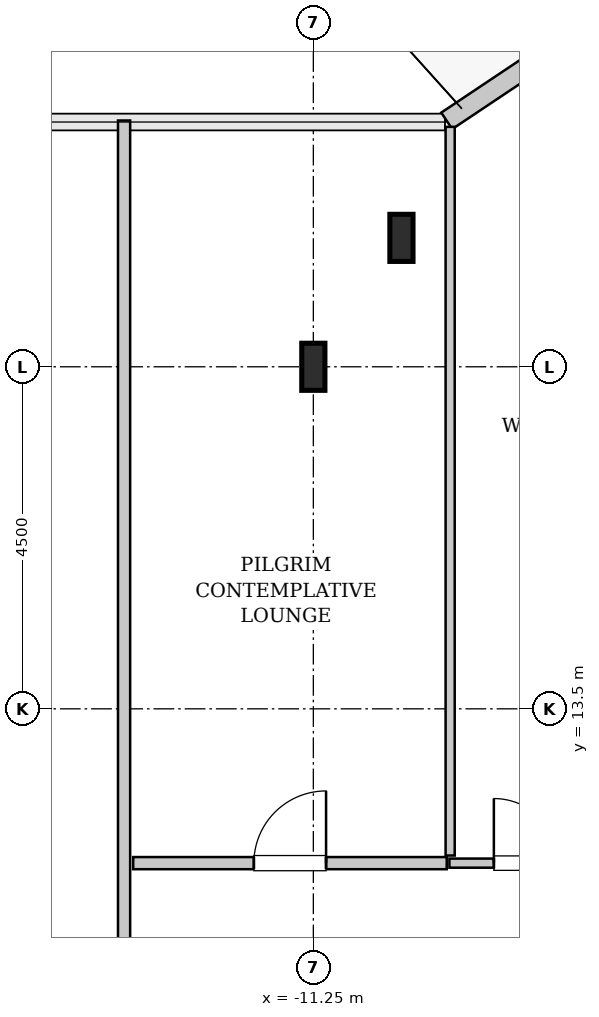
"""IFC4 building model, lengths in metres.
Left out: names, types, materials, properties, quantities, classifications, styles, units other than length and angle.
Written with IfcOpenShell. Run it as: python <this file> out.ifc"""

import sys

from ifc_helpers import new_model, si_unit, direction, frame, frame_2d, origin, origin_2d, place, context, subcontext, project, spatial, rectangle, i_section, extrude, source, transform, mapped, element, fill, save


model = new_model("IFC4")
c1 = context("Model", 3, precision=1e-05, world=origin(), true_north=direction((0.0, 1.0)))
c2 = subcontext(c1, "Body", "Model", "MODEL_VIEW")
j1 = project(units=[si_unit("LENGTHUNIT", "METRE"), si_unit("PLANEANGLEUNIT", "RADIAN")], contexts=[c1])
p1 = place(None, origin())
s1 = spatial("IfcSite", under=j1, at=p1, CompositionType="ELEMENT")
p2 = place(p1, origin())
s2 = spatial("IfcBuilding", under=s1, at=p2, CompositionType="ELEMENT")
p3 = place(p2, frame((0.0, 0.0, 287.4)))
s3 = spatial("IfcBuildingStorey", under=s2, at=p3, CompositionType="ELEMENT", Elevation=287.4)
m1 = source(origin(), c2, "Body", "SweptSolid", [
    extrude(i_section(OverallWidth=0.305, OverallDepth=0.62, WebThickness=0.021, FlangeThickness=0.04, FilletRadius=0.027, at=origin_2d()), origin(), (0.0, 0.0, 1.0), 3.8),
])
for number, where, z_axis, x_axis in (
    (1, (-11.25, 18.0, 0.0), (0.0, 0.0, 1.0), (1.0, 0.0, 0.0)),
    (2, (-10.091, 19.696, 0.0), (0.0, 0.0, 1.0), (1.0, 0.0, 0.0)),
):
    element("IfcColumn", number, at=place(p3, frame(where, z_axis=z_axis, x_axis=x_axis)), inside=s3, PredefinedType="COLUMN", context=c2, shape_type="MappedRepresentation", body=[
        mapped(m1, transform((0.0, 0.0, 0.0), x_axis=(1.0, 0.0, 0.0), y_axis=(0.0, 1.0, 0.0), z_axis=(0.0, 0.0, 1.0), scale=1.0)),
    ])
m2 = source(origin(), c2, "Body", "SweptSolid", [
    extrude(rectangle(XDim=1.469, YDim=0.26, at=frame_2d((0.734, 0.0))), origin(), (0.0, 0.0, 1.0), 3.55),
])
p4 = place(p3, frame((-8.273, 22.052, 0.0), z_axis=(0.0, 0.0, 1.0), x_axis=(-0.831461760506, -0.555581983884, 0.0)))
e3 = element("IfcWall", 3, at=p4, inside=s3, PredefinedType="SOLIDWALL", context=c2, shape_type="MappedRepresentation", body=[
    mapped(m2, transform((0.0, 0.0, 0.0), x_axis=(1.0, 0.0, 0.0), y_axis=(0.0, 1.0, 0.0), z_axis=(0.0, 0.0, 1.0), scale=1.0)),
])
m3 = source(origin(), c2, "Body", "SweptSolid", [
    extrude(rectangle(XDim=2.02, YDim=0.12, at=frame_2d((1.01, 0.0))), origin(), (0.0, 0.0, 1.0), 3.535),
])
p5 = place(p3, frame((-9.46, 11.47, 0.0), z_axis=(0.0, 0.0, 1.0), x_axis=(1.0, 0.0, 0.0)))
e4 = element("IfcWall", 4, at=p5, inside=s3, PredefinedType="PLUMBINGWALL", context=c2, shape_type="MappedRepresentation", body=[
    mapped(m3, transform((0.0, 0.0, 0.0), x_axis=(1.0, 0.0, 0.0), y_axis=(0.0, 1.0, 0.0), z_axis=(0.0, 0.0, 1.0), scale=1.0)),
])
p6 = place(p5, frame((0.585, 0.0, 0.0)))
e5 = element("IfcOpeningElement", 5, at=p6, cuts=e4, PredefinedType="OPENING", context=c2, shape_type="SweptSolid", body=[
    extrude(rectangle(XDim=0.85, YDim=2.1, at=frame_2d((0.425, 1.05))), frame((0.0, 0.07, 0.0), z_axis=(0.0, -1.0, 0.0), x_axis=(1.0, 0.0, 0.0)), (0.0, 0.0, 1.0), 0.14),
])
m4 = source(origin(), c2, "Body", "SweptSolid", [
    extrude(rectangle(XDim=9.587, YDim=0.12, at=frame_2d((4.793, 0.0))), origin(), (0.0, 0.0, 1.0), 3.535),
])
p7 = place(p3, frame((-9.45, 11.57, 0.0), z_axis=(0.0, 0.0, 1.0), x_axis=(0.0, 1.0, 0.0)))
e6 = element("IfcWall", 6, at=p7, inside=s3, PredefinedType="PLUMBINGWALL", context=c2, shape_type="MappedRepresentation", body=[
    mapped(m4, transform((0.0, 0.0, 0.0), x_axis=(1.0, 0.0, 0.0), y_axis=(0.0, 1.0, 0.0), z_axis=(0.0, 0.0, 1.0), scale=1.0)),
])
m5 = source(origin(), c2, "Body", "SweptSolid", [
    extrude(rectangle(XDim=12.752, YDim=0.16, at=frame_2d((6.376, 0.0))), origin(), (0.0, 0.0, 1.0), 3.535),
])
p8 = place(p3, frame((-13.74, 8.488, 0.0), z_axis=(0.0, 0.0, 1.0), x_axis=(0.0, 1.0, 0.0)))
e7 = element("IfcWall", 7, at=p8, inside=s3, PredefinedType="PARTITIONING", context=c2, shape_type="MappedRepresentation", body=[
    mapped(m5, transform((0.0, 0.0, 0.0), x_axis=(1.0, 0.0, 0.0), y_axis=(0.0, 1.0, 0.0), z_axis=(0.0, 0.0, 1.0), scale=1.0)),
])
p9 = place(p8, frame((1.036, 0.0, 0.0)))
e8 = element("IfcOpeningElement", 8, at=p9, cuts=e7, PredefinedType="OPENING", context=c2, shape_type="SweptSolid", body=[
    extrude(rectangle(XDim=0.95, YDim=2.1, at=frame_2d((0.475, 1.05))), frame((0.0, 0.09, 0.0), z_axis=(0.0, -1.0, 0.0), x_axis=(1.0, 0.0, 0.0)), (0.0, 0.0, 1.0), 0.18),
])
m6 = source(origin(), c2, "Body", "SweptSolid", [
    extrude(rectangle(XDim=4.125, YDim=0.16, at=frame_2d((2.062, 0.0))), origin(), (0.0, 0.0, 1.0), 3.535),
])
p10 = place(p3, frame((-13.62, 11.47, 0.0), z_axis=(0.0, 0.0, 1.0), x_axis=(1.0, 0.0, 0.0)))
e9 = element("IfcWall", 9, at=p10, inside=s3, PredefinedType="PARTITIONING", context=c2, shape_type="MappedRepresentation", body=[
    mapped(m6, transform((0.0, 0.0, 0.0), x_axis=(1.0, 0.0, 0.0), y_axis=(0.0, 1.0, 0.0), z_axis=(0.0, 0.0, 1.0), scale=1.0)),
])
p11 = place(p10, frame((1.587, 0.0, 0.0)))
e10 = element("IfcOpeningElement", 10, at=p11, cuts=e9, PredefinedType="OPENING", context=c2, shape_type="SweptSolid", body=[
    extrude(rectangle(XDim=0.95, YDim=2.1, at=frame_2d((0.475, 1.05))), frame((0.0, 0.09, 0.0), z_axis=(0.0, -1.0, 0.0), x_axis=(1.0, 0.0, 0.0)), (0.0, 0.0, 1.0), 0.18),
])
m7 = source(origin(), c2, "Body", "SweptSolid", [
    extrude(rectangle(XDim=0.85, YDim=2.1, at=frame_2d((0.425, 1.05))), frame((0.0, 0.025, 0.0), z_axis=(0.0, -1.0, 0.0), x_axis=(1.0, 0.0, 0.0)), (0.0, 0.0, 1.0), 0.05),
])
p12 = place(p6, origin())
e11 = element("IfcDoor", 11, at=p12, inside=s3, OperationType="SINGLE_SWING_LEFT", PredefinedType="DOOR", context=c2, shape_type="MappedRepresentation", body=[
    mapped(m7, transform((0.0, 0.0, 0.0), x_axis=(1.0, 0.0, 0.0), y_axis=(0.0, 1.0, 0.0), z_axis=(0.0, 0.0, 1.0), scale=1.0)),
])
fill(e5, e11)
m8 = source(origin(), c2, "Body", "SweptSolid", [
    extrude(rectangle(XDim=0.95, YDim=2.1, at=frame_2d((0.475, 1.05))), frame((0.0, 0.025, 0.0), z_axis=(0.0, -1.0, 0.0), x_axis=(1.0, 0.0, 0.0)), (0.0, 0.0, 1.0), 0.05),
])
p13 = place(p11, origin())
e12 = element("IfcDoor", 12, at=p13, inside=s3, OperationType="SINGLE_SWING_RIGHT", PredefinedType="DOOR", context=c2, shape_type="MappedRepresentation", body=[
    mapped(m8, transform((0.0, 0.0, 0.0), x_axis=(1.0, 0.0, 0.0), y_axis=(0.0, 1.0, 0.0), z_axis=(0.0, 0.0, 1.0), scale=1.0)),
])
fill(e10, e12)
save(model, sys.argv[1])
